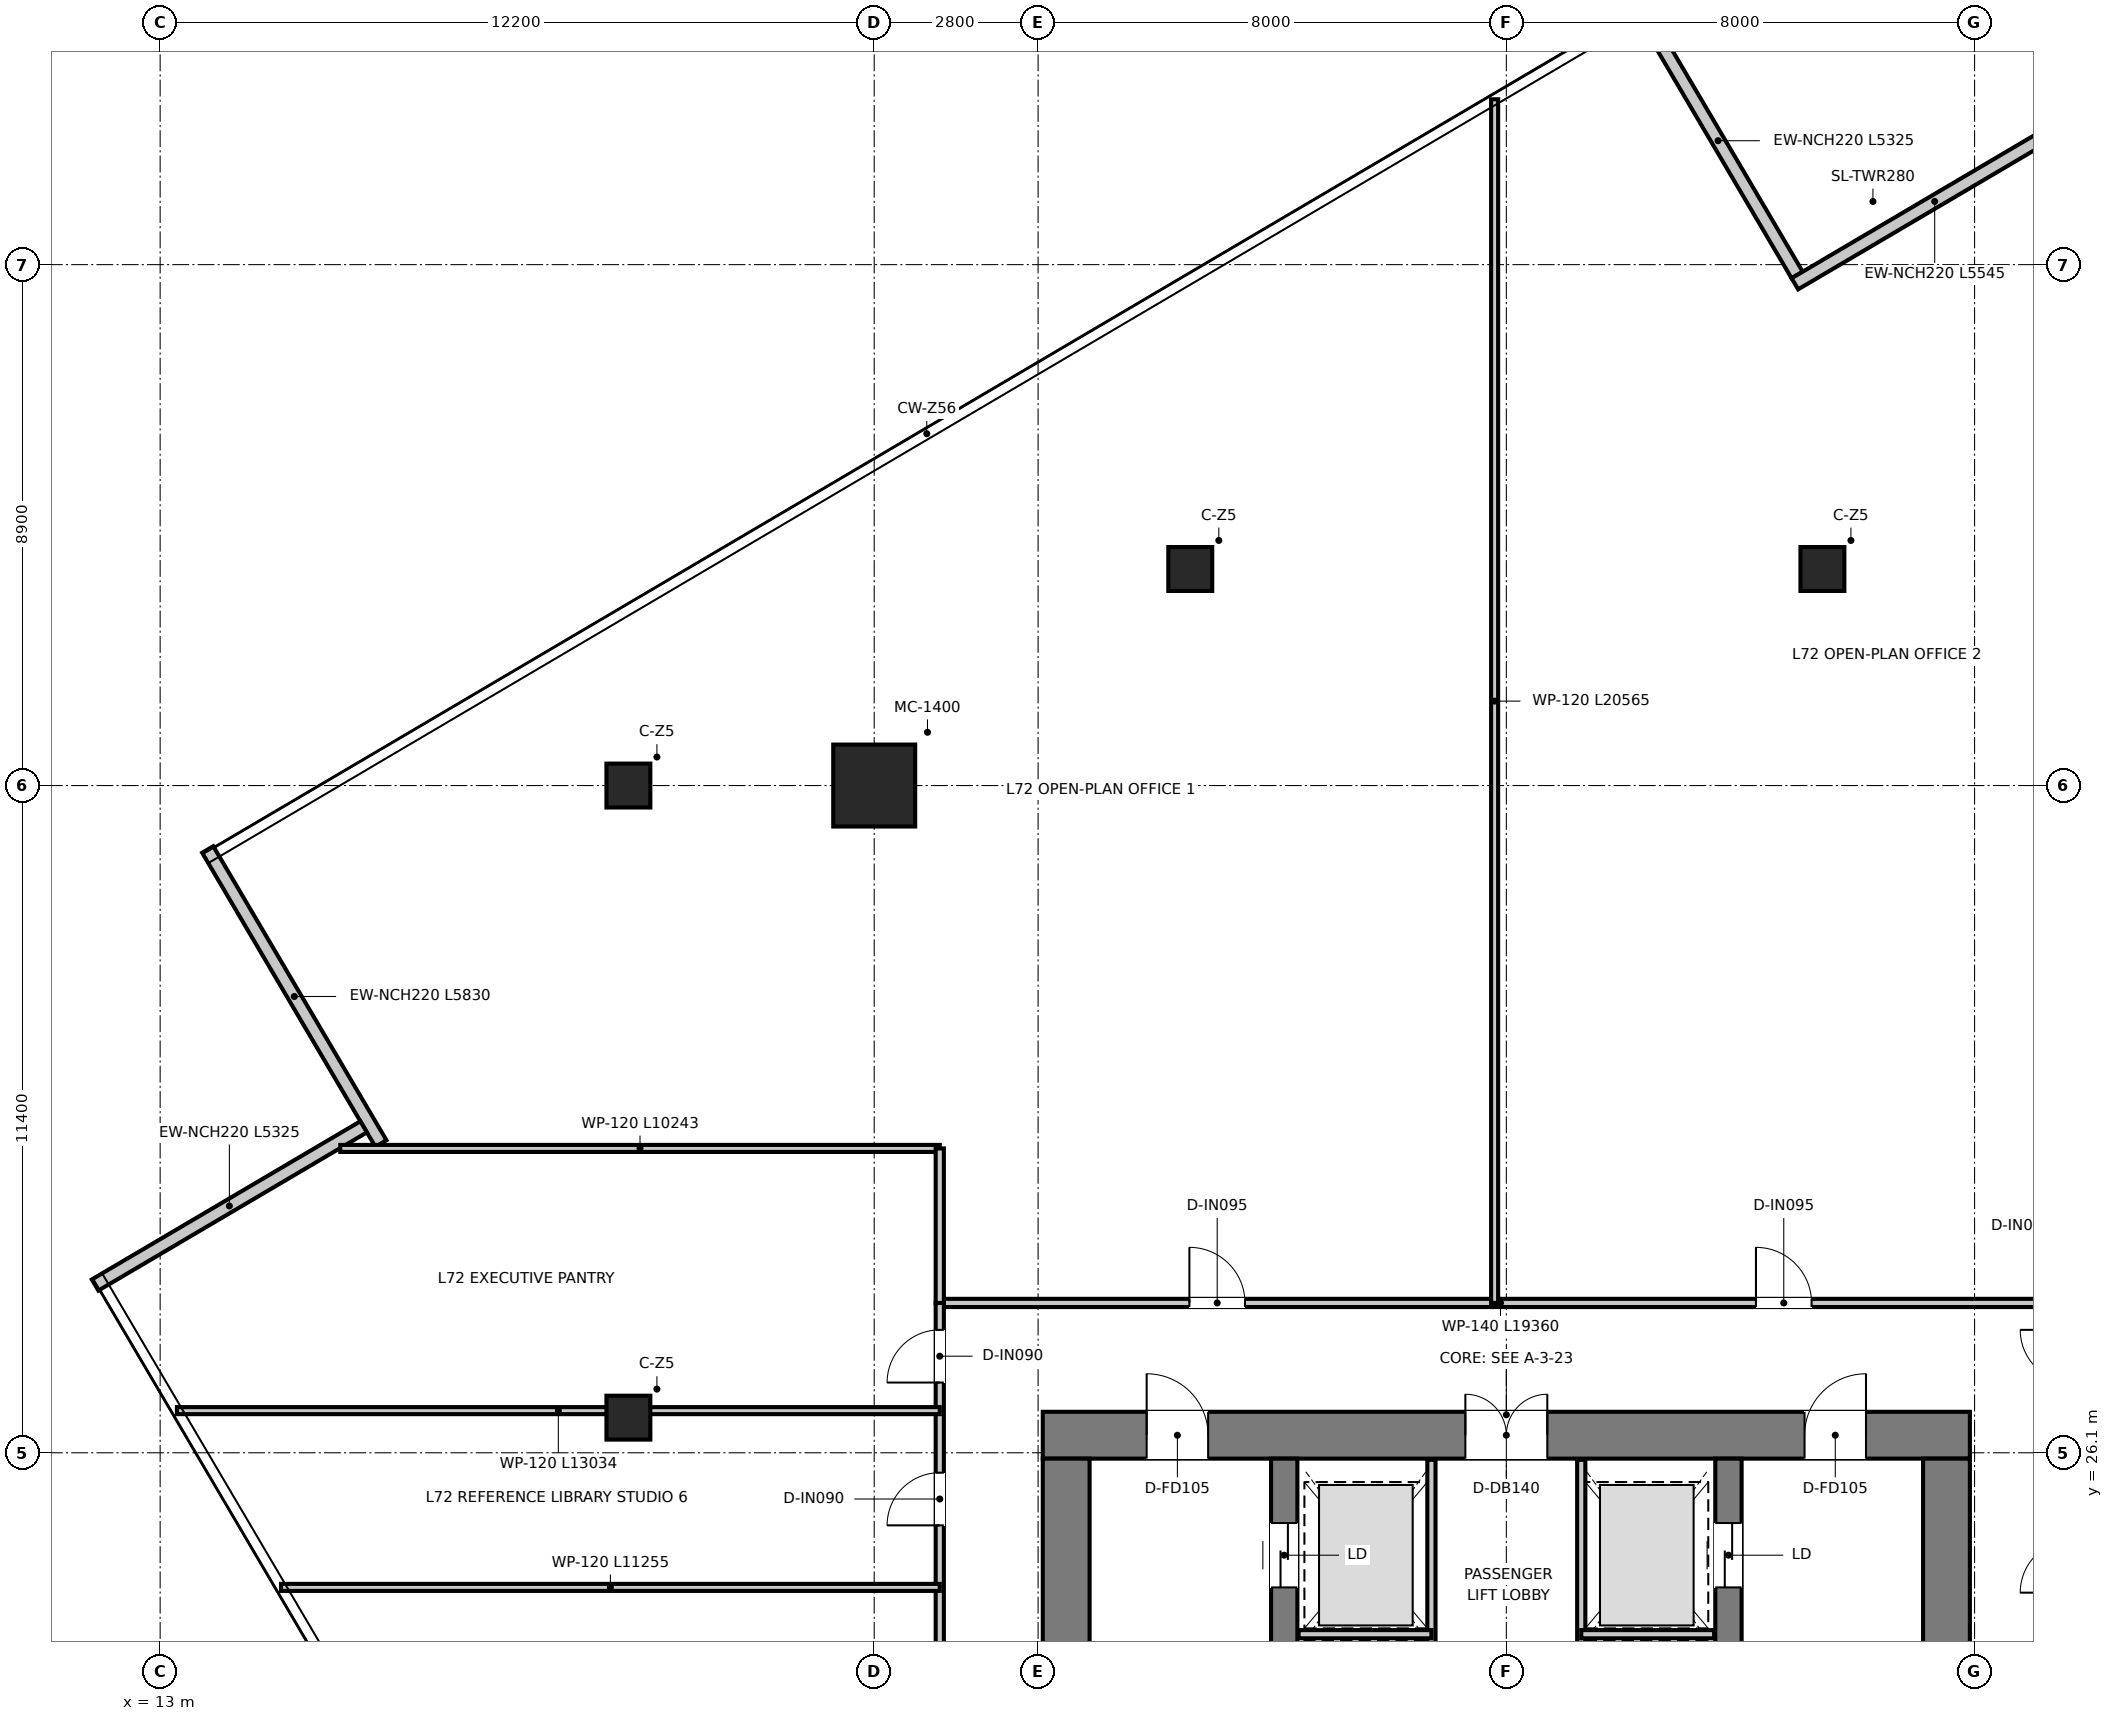
"""IFC4 building model, lengths in metres.
Left out: names, types, materials, properties, quantities, classifications, styles, units other than length and angle.
Written with IfcOpenShell. Run it as: python <this file> out.ifc"""

import sys

from ifc_helpers import new_model, si_unit, direction, frame, frame_2d, origin, origin_2d, place, context, subcontext, project, spatial, rectangle, extrude, source, transform, mapped, element, fill, save


model = new_model("IFC4")
c1 = context("Model", 3, precision=1e-05, world=origin(), true_north=direction((0.0, 1.0)))
c2 = subcontext(c1, "Body", "Model", "MODEL_VIEW")
j1 = project(units=[si_unit("LENGTHUNIT", "METRE"), si_unit("PLANEANGLEUNIT", "RADIAN")], contexts=[c1])
p1 = place(None, origin())
s1 = spatial("IfcSite", under=j1, at=p1, CompositionType="ELEMENT")
p2 = place(p1, origin())
s2 = spatial("IfcBuilding", under=s1, at=p2, CompositionType="ELEMENT")
p3 = place(p2, frame((0.0, 0.0, 295.05)))
s3 = spatial("IfcBuildingStorey", under=s2, at=p3, CompositionType="ELEMENT", Elevation=295.05)
p4 = place(p3, frame((28.08, 26.4, 0.0), z_axis=(0.0, 0.0, 1.0), x_axis=(1.0, 0.0, 0.0)))
e1 = element("IfcWall", 1, at=p4, inside=s3, PredefinedType="SHEAR", context=c2, shape_type="SweptSolid", body=[
    extrude(rectangle(XDim=15.84, YDim=0.8, at=frame_2d((7.92, 0.0))), origin(), (0.0, 0.0, 1.0), 3.95),
])
p5 = place(p4, frame((7.22, 0.0, 0.0)))
e2 = element("IfcOpeningElement", 2, at=p5, cuts=e1, PredefinedType="OPENING", context=c2, shape_type="SweptSolid", body=[
    extrude(rectangle(XDim=1.4, YDim=2.2, at=frame_2d((0.7, 1.1))), frame((0.0, 0.41, 0.0), z_axis=(0.0, -1.0, 0.0), x_axis=(1.0, 0.0, 0.0)), (0.0, 0.0, 1.0), 0.82),
])
p6 = place(p4, frame((1.775, 0.0, 0.0)))
e3 = element("IfcOpeningElement", 3, at=p6, cuts=e1, PredefinedType="OPENING", context=c2, shape_type="SweptSolid", body=[
    extrude(rectangle(XDim=1.05, YDim=2.1, at=frame_2d((0.525, 1.05))), frame((0.0, 0.41, 0.0), z_axis=(0.0, -1.0, 0.0), x_axis=(1.0, 0.0, 0.0)), (0.0, 0.0, 1.0), 0.82),
])
p7 = place(p4, frame((13.015, 0.0, 0.0)))
e4 = element("IfcOpeningElement", 4, at=p7, cuts=e1, PredefinedType="OPENING", context=c2, shape_type="SweptSolid", body=[
    extrude(rectangle(XDim=1.05, YDim=2.1, at=frame_2d((0.525, 1.05))), frame((0.0, 0.41, 0.0), z_axis=(0.0, -1.0, 0.0), x_axis=(1.0, 0.0, 0.0)), (0.0, 0.0, 1.0), 0.82),
])
for number, where, z_axis, x_axis in (
    (5, (28.48, 11.3, 0.0), (0.0, 0.0, 1.0), (0.0, 1.0, 0.0)),
    (6, (43.52, 11.3, 0.0), (0.0, 0.0, 1.0), (0.0, 1.0, 0.0)),
):
    element("IfcWall", number, at=place(p3, frame(where, z_axis=z_axis, x_axis=x_axis)), inside=s3, PredefinedType="SHEAR", context=c2, shape_type="SweptSolid", body=[
        extrude(rectangle(XDim=14.7, YDim=0.8, at=frame_2d((7.35, 0.0))), origin(), (0.0, 0.0, 1.0), 3.95),
    ])
p8 = place(p3, frame((32.205, 13.22, 0.0), z_axis=(0.0, 0.0, 1.0), x_axis=(0.0, 1.0, 0.0)))
e7 = element("IfcWall", 7, at=p8, inside=s3, PredefinedType="SHEAR", context=c2, shape_type="SweptSolid", body=[
    extrude(rectangle(XDim=12.78, YDim=0.45, at=frame_2d((6.39, 0.0))), origin(), (0.0, 0.0, 1.0), 3.95),
])
p9 = place(p8, frame((10.58, 0.0, 0.0)))
e8 = element("IfcOpeningElement", 8, at=p9, cuts=e7, PredefinedType="OPENING", context=c2, shape_type="SweptSolid", body=[
    extrude(rectangle(XDim=1.1, YDim=2.15, at=frame_2d((0.55, 1.075))), frame((0.0, 0.235, 0.0), z_axis=(0.0, -1.0, 0.0), x_axis=(1.0, 0.0, 0.0)), (0.0, 0.0, 1.0), 0.47),
])
p10 = place(p3, frame((39.795, 13.22, 0.0), z_axis=(0.0, 0.0, 1.0), x_axis=(0.0, 1.0, 0.0)))
e9 = element("IfcWall", 9, at=p10, inside=s3, PredefinedType="SHEAR", context=c2, shape_type="SweptSolid", body=[
    extrude(rectangle(XDim=12.78, YDim=0.45, at=frame_2d((6.39, 0.0))), origin(), (0.0, 0.0, 1.0), 3.95),
])
p11 = place(p10, frame((10.58, 0.0, 0.0)))
e10 = element("IfcOpeningElement", 10, at=p11, cuts=e9, PredefinedType="OPENING", context=c2, shape_type="SweptSolid", body=[
    extrude(rectangle(XDim=1.1, YDim=2.15, at=frame_2d((0.55, 1.075))), frame((0.0, 0.235, 0.0), z_axis=(0.0, -1.0, 0.0), x_axis=(1.0, 0.0, 0.0)), (0.0, 0.0, 1.0), 0.47),
])
m1 = source(origin(), c2, "Body", "SweptSolid", [
    extrude(rectangle(XDim=1.4, YDim=1.4, at=origin_2d()), origin(), (0.0, 0.0, 1.0), 3.95),
])
p12 = place(p3, frame((25.2, 37.5, 0.0), z_axis=(0.0, 0.0, 1.0), x_axis=(1.0, 0.0, 0.0)))
e11 = element("IfcColumn", 11, at=p12, inside=s3, PredefinedType="USERDEFINED", context=c2, shape_type="MappedRepresentation", body=[
    mapped(m1, transform((0.0, 0.0, 0.0), x_axis=(1.0, 0.0, 0.0), y_axis=(0.0, 1.0, 0.0), z_axis=(0.0, 0.0, 1.0), scale=1.0)),
])
m2 = source(origin(), c2, "Body", "SweptSolid", [
    extrude(rectangle(XDim=0.75, YDim=0.75, at=origin_2d()), origin(), (0.0, 0.0, 1.0), 3.95),
])
for number, where, z_axis, x_axis in (
    (12, (21.0, 26.7, 0.0), (0.0, 0.0, 1.0), (1.0, 0.0, 0.0)),
    (13, (21.0, 37.5, 0.0), (0.0, 0.0, 1.0), (1.0, 0.0, 0.0)),
    (14, (30.6, 41.2, 0.0), (0.0, 0.0, 1.0), (1.0, 0.0, 0.0)),
    (15, (41.4, 41.2, 0.0), (0.0, 0.0, 1.0), (1.0, 0.0, 0.0)),
):
    element("IfcColumn", number, at=place(p3, frame(where, z_axis=z_axis, x_axis=x_axis)), inside=s3, PredefinedType="COLUMN", context=c2, shape_type="MappedRepresentation", body=[
        mapped(m2, transform((0.0, 0.0, 0.0), x_axis=(1.0, 0.0, 0.0), y_axis=(0.0, 1.0, 0.0), z_axis=(0.0, 0.0, 1.0), scale=1.0)),
    ])
p13 = place(p3, frame((40.969, 46.223, 0.0), z_axis=(0.0, 0.0, 1.0), x_axis=(-0.507540984104, 0.861627616465, 0.0)))
e16 = element("IfcWall", 16, at=p13, inside=s3, PredefinedType="ELEMENTEDWALL", context=c2, shape_type="SweptSolid", body=[
    extrude(rectangle(XDim=5.325, YDim=0.22, at=frame_2d((2.663, 0.0))), origin(), (0.0, 0.0, 1.0), 3.67),
])
p14 = place(p3, frame((13.813, 36.407, 0.0), z_axis=(0.0, 0.0, 1.0), x_axis=(0.507550761113, -0.861621857252, 0.0)))
e17 = element("IfcWall", 17, at=p14, inside=s3, PredefinedType="ELEMENTEDWALL", context=c2, shape_type="SweptSolid", body=[
    extrude(rectangle(XDim=5.83, YDim=0.22, at=frame_2d((2.915, 0.0))), origin(), (0.0, 0.0, 1.0), 3.67),
])
p15 = place(p3, frame((16.477, 31.669, 0.0), z_axis=(0.0, 0.0, 1.0), x_axis=(-0.861627616465, -0.507540984104, 0.0)))
e18 = element("IfcWall", 18, at=p15, inside=s3, PredefinedType="ELEMENTEDWALL", context=c2, shape_type="SweptSolid", body=[
    extrude(rectangle(XDim=5.325, YDim=0.22, at=frame_2d((2.663, 0.0))), origin(), (0.0, 0.0, 1.0), 3.67),
])
p16 = place(p3, frame((45.708, 48.887, 0.0), z_axis=(0.0, 0.0, 1.0), x_axis=(-0.861640923955, -0.507518391948, 0.0)))
e19 = element("IfcWall", 19, at=p16, inside=s3, PredefinedType="ELEMENTEDWALL", context=c2, shape_type="SweptSolid", body=[
    extrude(rectangle(XDim=5.545, YDim=0.22, at=frame_2d((2.772, 0.0))), origin(), (0.0, 0.0, 1.0), 3.67),
])
p17 = place(p3, frame((34.72, 20.2, 0.0), z_axis=(0.0, 0.0, 1.0), x_axis=(0.0, 1.0, 0.0)))
e20 = element("IfcWall", 20, at=p17, inside=s3, PredefinedType="PARTITIONING", context=c2, shape_type="SweptSolid", body=[
    extrude(rectangle(XDim=5.78, YDim=0.14, at=frame_2d((2.89, 0.0))), origin(), (0.0, 0.0, 1.0), 2.82),
])
p18 = place(p17, frame((1.05, 0.0, 0.0)))
e21 = element("IfcOpeningElement", 21, at=p18, cuts=e20, PredefinedType="OPENING", context=c2, shape_type="SweptSolid", body=[
    extrude(rectangle(XDim=0.9, YDim=2.1, at=frame_2d((0.45, 1.05))), frame((0.0, 0.08, 0.0), z_axis=(0.0, -1.0, 0.0), x_axis=(1.0, 0.0, 0.0)), (0.0, 0.0, 1.0), 0.16),
])
p19 = place(p3, frame((37.28, 20.2, 0.0), z_axis=(0.0, 0.0, 1.0), x_axis=(0.0, 1.0, 0.0)))
e22 = element("IfcWall", 22, at=p19, inside=s3, PredefinedType="PARTITIONING", context=c2, shape_type="SweptSolid", body=[
    extrude(rectangle(XDim=5.78, YDim=0.14, at=frame_2d((2.89, 0.0))), origin(), (0.0, 0.0, 1.0), 2.82),
])
p20 = place(p19, frame((0.95, 0.0, 0.0)))
e23 = element("IfcOpeningElement", 23, at=p20, cuts=e22, PredefinedType="OPENING", context=c2, shape_type="SweptSolid", body=[
    extrude(rectangle(XDim=1.1, YDim=2.15, at=frame_2d((0.55, 1.075))), frame((0.0, 0.08, 0.0), z_axis=(0.0, -1.0, 0.0), x_axis=(1.0, 0.0, 0.0)), (0.0, 0.0, 1.0), 0.16),
])
for number, where, z_axis, x_axis in (
    (24, (32.45, 23.0, 0.0), (0.0, 0.0, 1.0), (1.0, 0.0, 0.0)),
    (25, (37.28, 23.0, 0.0), (0.0, 0.0, 1.0), (1.0, 0.0, 0.0)),
):
    element("IfcWall", number, at=place(p3, frame(where, z_axis=z_axis, x_axis=x_axis)), inside=s3, PredefinedType="PARTITIONING", context=c2, shape_type="SweptSolid", body=[
        extrude(rectangle(XDim=2.27, YDim=0.14, at=frame_2d((1.135, 0.0))), origin(), (0.0, 0.0, 1.0), 2.82),
    ])
p21 = place(p3, frame((26.32, 28.66, 0.0), z_axis=(0.0, 0.0, 1.0), x_axis=(1.0, 0.0, 0.0)))
e26 = element("IfcWall", 26, at=p21, inside=s3, PredefinedType="PARTITIONING", context=c2, shape_type="SweptSolid", body=[
    extrude(rectangle(XDim=19.36, YDim=0.14, at=frame_2d((9.68, 0.0))), origin(), (0.0, 0.0, 1.0), 3.18),
])
p22 = place(p21, frame((4.265, 0.0, 0.0)))
e27 = element("IfcOpeningElement", 27, at=p22, cuts=e26, PredefinedType="OPENING", context=c2, shape_type="SweptSolid", body=[
    extrude(rectangle(XDim=0.95, YDim=2.1, at=frame_2d((0.475, 1.05))), frame((0.0, 0.08, 0.0), z_axis=(0.0, -1.0, 0.0), x_axis=(1.0, 0.0, 0.0)), (0.0, 0.0, 1.0), 0.16),
])
p23 = place(p21, frame((13.945, 0.0, 0.0)))
e28 = element("IfcOpeningElement", 28, at=p23, cuts=e26, PredefinedType="OPENING", context=c2, shape_type="SweptSolid", body=[
    extrude(rectangle(XDim=0.95, YDim=2.1, at=frame_2d((0.475, 1.05))), frame((0.0, 0.08, 0.0), z_axis=(0.0, -1.0, 0.0), x_axis=(1.0, 0.0, 0.0)), (0.0, 0.0, 1.0), 0.16),
])
p24 = place(p3, frame((26.32, 9.0, 0.0), z_axis=(0.0, 0.0, 1.0), x_axis=(0.0, 1.0, 0.0)))
e29 = element("IfcWall", 29, at=p24, inside=s3, PredefinedType="PARTITIONING", context=c2, shape_type="SweptSolid", body=[
    extrude(rectangle(XDim=19.66, YDim=0.14, at=frame_2d((9.83, 0.0))), origin(), (0.0, 0.0, 1.0), 3.13),
])
p25 = place(p24, frame((18.3, 0.0, 0.0)))
e30 = element("IfcOpeningElement", 30, at=p25, cuts=e29, PredefinedType="OPENING", context=c2, shape_type="SweptSolid", body=[
    extrude(rectangle(XDim=0.9, YDim=2.1, at=frame_2d((0.45, 1.05))), frame((0.0, 0.08, 0.0), z_axis=(0.0, -1.0, 0.0), x_axis=(1.0, 0.0, 0.0)), (0.0, 0.0, 1.0), 0.16),
])
p26 = place(p24, frame((1.65, 0.0, 0.0)))
e31 = element("IfcOpeningElement", 31, at=p26, cuts=e29, PredefinedType="OPENING", context=c2, shape_type="SweptSolid", body=[
    extrude(rectangle(XDim=0.9, YDim=2.1, at=frame_2d((0.45, 1.05))), frame((0.0, 0.08, 0.0), z_axis=(0.0, -1.0, 0.0), x_axis=(1.0, 0.0, 0.0)), (0.0, 0.0, 1.0), 0.16),
])
p27 = place(p24, frame((8.7, 0.0, 0.0)))
e32 = element("IfcOpeningElement", 32, at=p27, cuts=e29, PredefinedType="OPENING", context=c2, shape_type="SweptSolid", body=[
    extrude(rectangle(XDim=0.9, YDim=2.1, at=frame_2d((0.45, 1.05))), frame((0.0, 0.08, 0.0), z_axis=(0.0, -1.0, 0.0), x_axis=(1.0, 0.0, 0.0)), (0.0, 0.0, 1.0), 0.16),
])
p28 = place(p24, frame((11.85, 0.0, 0.0)))
e33 = element("IfcOpeningElement", 33, at=p28, cuts=e29, PredefinedType="OPENING", context=c2, shape_type="SweptSolid", body=[
    extrude(rectangle(XDim=0.9, YDim=2.1, at=frame_2d((0.45, 1.05))), frame((0.0, 0.08, 0.0), z_axis=(0.0, -1.0, 0.0), x_axis=(1.0, 0.0, 0.0)), (0.0, 0.0, 1.0), 0.16),
])
p29 = place(p24, frame((15.86, 0.0, 0.0)))
e34 = element("IfcOpeningElement", 34, at=p29, cuts=e29, PredefinedType="OPENING", context=c2, shape_type="SweptSolid", body=[
    extrude(rectangle(XDim=0.9, YDim=2.1, at=frame_2d((0.45, 1.05))), frame((0.0, 0.08, 0.0), z_axis=(0.0, -1.0, 0.0), x_axis=(1.0, 0.0, 0.0)), (0.0, 0.0, 1.0), 0.16),
])
p30 = place(p3, frame((13.286, 26.82, 0.0), z_axis=(0.0, 0.0, 1.0), x_axis=(1.0, 0.0, 0.0)))
e35 = element("IfcWall", 35, at=p30, inside=s3, PredefinedType="PARTITIONING", context=c2, shape_type="SweptSolid", body=[
    extrude(rectangle(XDim=13.034, YDim=0.12, at=frame_2d((6.517, 0.0))), origin(), (0.0, 0.0, 1.0), 3.13),
])
p31 = place(p3, frame((16.077, 31.3, 0.0), z_axis=(0.0, 0.0, 1.0), x_axis=(1.0, 0.0, 0.0)))
e36 = element("IfcWall", 36, at=p31, inside=s3, PredefinedType="PARTITIONING", context=c2, shape_type="SweptSolid", body=[
    extrude(rectangle(XDim=10.243, YDim=0.12, at=frame_2d((5.121, 0.0))), origin(), (0.0, 0.0, 1.0), 3.13),
])
p32 = place(p3, frame((26.32, 28.66, 0.0), z_axis=(0.0, 0.0, 1.0), x_axis=(0.0, 1.0, 0.0)))
e37 = element("IfcWall", 37, at=p32, inside=s3, PredefinedType="PARTITIONING", context=c2, shape_type="SweptSolid", body=[
    extrude(rectangle(XDim=2.64, YDim=0.14, at=frame_2d((1.32, 0.0))), origin(), (0.0, 0.0, 1.0), 3.43),
])
p33 = place(p3, frame((35.8, 28.66, 0.0), z_axis=(0.0, 0.0, 1.0), x_axis=(0.0, 1.0, 0.0)))
e38 = element("IfcWall", 38, at=p33, inside=s3, PredefinedType="PARTITIONING", context=c2, shape_type="SweptSolid", body=[
    extrude(rectangle(XDim=20.565, YDim=0.12, at=frame_2d((10.283, 0.0))), origin(), (0.0, 0.0, 1.0), 3.13),
])
p34 = place(p3, frame((15.065, 23.8, 0.0), z_axis=(0.0, 0.0, 1.0), x_axis=(1.0, 0.0, 0.0)))
e39 = element("IfcWall", 39, at=p34, inside=s3, PredefinedType="PARTITIONING", context=c2, shape_type="SweptSolid", body=[
    extrude(rectangle(XDim=11.255, YDim=0.12, at=frame_2d((5.627, 0.0))), origin(), (0.0, 0.0, 1.0), 3.13),
])
p35 = place(p5, origin())
e40 = element("IfcDoor", 40, at=p35, inside=s3, OperationType="DOUBLE_DOOR_SINGLE_SWING", PredefinedType="DOOR", context=c2, shape_type="SweptSolid", body=[
    extrude(rectangle(XDim=1.4, YDim=2.2, at=frame_2d((0.7, 1.1))), frame((0.0, 0.025, 0.0), z_axis=(0.0, -1.0, 0.0), x_axis=(1.0, 0.0, 0.0)), (0.0, 0.0, 1.0), 0.05),
])
fill(e2, e40)
p36 = place(p6, origin())
e41 = element("IfcDoor", 41, at=p36, inside=s3, OperationType="SINGLE_SWING_LEFT", PredefinedType="DOOR", context=c2, shape_type="SweptSolid", body=[
    extrude(rectangle(XDim=1.05, YDim=2.1, at=frame_2d((0.525, 1.05))), frame((0.0, 0.025, 0.0), z_axis=(0.0, -1.0, 0.0), x_axis=(1.0, 0.0, 0.0)), (0.0, 0.0, 1.0), 0.05),
])
fill(e3, e41)
p37 = place(p7, origin())
e42 = element("IfcDoor", 42, at=p37, inside=s3, OperationType="SINGLE_SWING_RIGHT", PredefinedType="DOOR", context=c2, shape_type="SweptSolid", body=[
    extrude(rectangle(XDim=1.05, YDim=2.1, at=frame_2d((0.525, 1.05))), frame((0.0, 0.025, 0.0), z_axis=(0.0, -1.0, 0.0), x_axis=(1.0, 0.0, 0.0)), (0.0, 0.0, 1.0), 0.05),
])
fill(e4, e42)
p38 = place(p9, origin())
e43 = element("IfcDoor", 43, at=p38, inside=s3, OperationType="DOUBLE_DOOR_SLIDING", PredefinedType="DOOR", context=c2, shape_type="SweptSolid", body=[
    extrude(rectangle(XDim=1.1, YDim=2.15, at=frame_2d((0.55, 1.075))), frame((0.0, 0.025, 0.0), z_axis=(0.0, -1.0, 0.0), x_axis=(1.0, 0.0, 0.0)), (0.0, 0.0, 1.0), 0.05),
])
fill(e8, e43)
p39 = place(p11, origin())
e44 = element("IfcDoor", 44, at=p39, inside=s3, OperationType="DOUBLE_DOOR_SLIDING", PredefinedType="DOOR", context=c2, shape_type="SweptSolid", body=[
    extrude(rectangle(XDim=1.1, YDim=2.15, at=frame_2d((0.55, 1.075))), frame((0.0, 0.025, 0.0), z_axis=(0.0, -1.0, 0.0), x_axis=(1.0, 0.0, 0.0)), (0.0, 0.0, 1.0), 0.05),
])
fill(e10, e44)
p40 = place(p25, origin())
e45 = element("IfcDoor", 45, at=p40, inside=s3, OperationType="SINGLE_SWING_LEFT", PredefinedType="DOOR", context=c2, shape_type="SweptSolid", body=[
    extrude(rectangle(XDim=0.9, YDim=2.1, at=frame_2d((0.45, 1.05))), frame((0.0, 0.025, 0.0), z_axis=(0.0, -1.0, 0.0), x_axis=(1.0, 0.0, 0.0)), (0.0, 0.0, 1.0), 0.05),
])
fill(e30, e45)
p41 = place(p22, origin())
e46 = element("IfcDoor", 46, at=p41, inside=s3, OperationType="SINGLE_SWING_LEFT", PredefinedType="DOOR", context=c2, shape_type="SweptSolid", body=[
    extrude(rectangle(XDim=0.95, YDim=2.1, at=frame_2d((0.475, 1.05))), frame((0.0, 0.025, 0.0), z_axis=(0.0, -1.0, 0.0), x_axis=(1.0, 0.0, 0.0)), (0.0, 0.0, 1.0), 0.05),
])
fill(e27, e46)
p42 = place(p23, origin())
e47 = element("IfcDoor", 47, at=p42, inside=s3, OperationType="SINGLE_SWING_LEFT", PredefinedType="DOOR", context=c2, shape_type="SweptSolid", body=[
    extrude(rectangle(XDim=0.95, YDim=2.1, at=frame_2d((0.475, 1.05))), frame((0.0, 0.025, 0.0), z_axis=(0.0, -1.0, 0.0), x_axis=(1.0, 0.0, 0.0)), (0.0, 0.0, 1.0), 0.05),
])
fill(e28, e47)
p43 = place(p29, origin())
e48 = element("IfcDoor", 48, at=p43, inside=s3, OperationType="SINGLE_SWING_LEFT", PredefinedType="DOOR", context=c2, shape_type="SweptSolid", body=[
    extrude(rectangle(XDim=0.9, YDim=2.1, at=frame_2d((0.45, 1.05))), frame((0.0, 0.025, 0.0), z_axis=(0.0, -1.0, 0.0), x_axis=(1.0, 0.0, 0.0)), (0.0, 0.0, 1.0), 0.05),
])
fill(e34, e48)
save(model, sys.argv[1])
